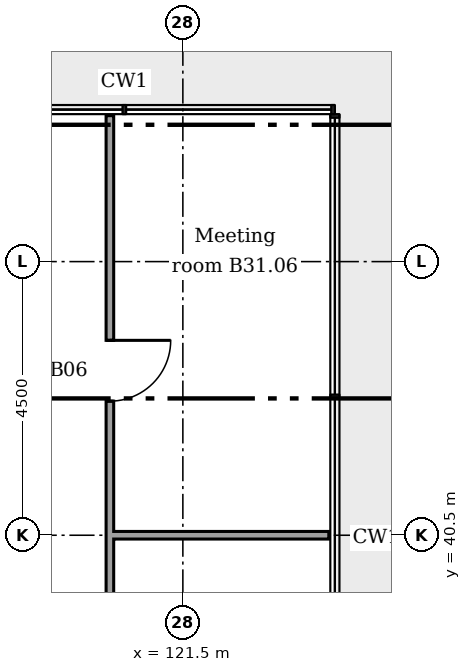
"""IFC4 building model, lengths in metres.
Left out: names, types, materials, properties, quantities, classifications, styles, units other than length and angle.
Written with IfcOpenShell. Run it as: python <this file> out.ifc"""

import sys

from ifc_helpers import new_model, si_unit, direction, frame, frame_2d, origin, place, context, subcontext, project, spatial, rectangle, extrude, element, fill, save


model = new_model("IFC4")
c1 = context("Model", 3, precision=1e-05, world=origin(), true_north=direction((0.0, 1.0)))
c2 = subcontext(c1, "Body", "Model", "MODEL_VIEW")
j1 = project(units=[si_unit("LENGTHUNIT", "METRE"), si_unit("PLANEANGLEUNIT", "RADIAN")], contexts=[c1])
p1 = place(None, origin())
s1 = spatial("IfcSite", under=j1, at=p1, CompositionType="ELEMENT")
p2 = place(p1, origin())
s2 = spatial("IfcBuilding", under=s1, at=p2, CompositionType="ELEMENT")
p3 = place(p2, frame((0.0, 0.0, 128.0)))
s3 = spatial("IfcBuildingStorey", under=s2, at=p3, CompositionType="ELEMENT", Elevation=128.0)
p4 = place(p3, frame((120.3, 40.5, 0.0)))
e1 = element("IfcWall", 1, at=p4, inside=s3, PredefinedType="PARTITIONING", context=c2, shape_type="SweptSolid", body=[
    extrude(rectangle(XDim=3.6, YDim=0.125, at=frame_2d((1.8, 0.0))), origin(), (0.0, 0.0, 1.0), 2.851),
])
p5 = place(p3, frame((120.3, 33.062, 0.0), z_axis=(0.0, 0.0, 1.0), x_axis=(0.0, 1.0, 0.0)))
e2 = element("IfcWall", 2, at=p5, inside=s3, PredefinedType="PARTITIONING", context=c2, shape_type="SweptSolid", body=[
    extrude(rectangle(XDim=14.337, YDim=0.125, at=frame_2d((7.169, 0.0))), origin(), (0.0, 0.0, 1.0), 3.45),
])
p6 = place(p5, frame((2.208, 0.0, 0.0)))
e3 = element("IfcOpeningElement", 3, at=p6, cuts=e2, PredefinedType="OPENING", context=c2, shape_type="SweptSolid", body=[
    extrude(rectangle(XDim=1.0, YDim=2.1, at=frame_2d((0.5, 1.05))), frame((0.0, 0.073, 0.0), z_axis=(0.0, -1.0, 0.0), x_axis=(1.0, 0.0, 0.0)), (0.0, 0.0, 1.0), 0.145),
])
p7 = place(p5, frame((9.643, 0.0, 0.0)))
e4 = element("IfcOpeningElement", 4, at=p7, cuts=e2, PredefinedType="OPENING", context=c2, shape_type="SweptSolid", body=[
    extrude(rectangle(XDim=1.0, YDim=2.1, at=frame_2d((0.5, 1.05))), frame((0.0, 0.073, 0.0), z_axis=(0.0, -1.0, 0.0), x_axis=(1.0, 0.0, 0.0)), (0.0, 0.0, 1.0), 0.145),
])
p8 = place(p7, frame((1.0, 0.0, 0.0), x_axis=(-1.0, 0.0, 0.0)))
e5 = element("IfcDoor", 5, at=p8, inside=s3, OperationType="SINGLE_SWING_RIGHT", PredefinedType="DOOR", context=c2, shape_type="SweptSolid", body=[
    extrude(rectangle(XDim=1.0, YDim=2.1, at=frame_2d((0.5, 1.05))), frame((0.0, 0.025, 0.0), z_axis=(0.0, -1.0, 0.0), x_axis=(1.0, 0.0, 0.0)), (0.0, 0.0, 1.0), 0.05),
])
fill(e4, e5)
save(model, sys.argv[1])
